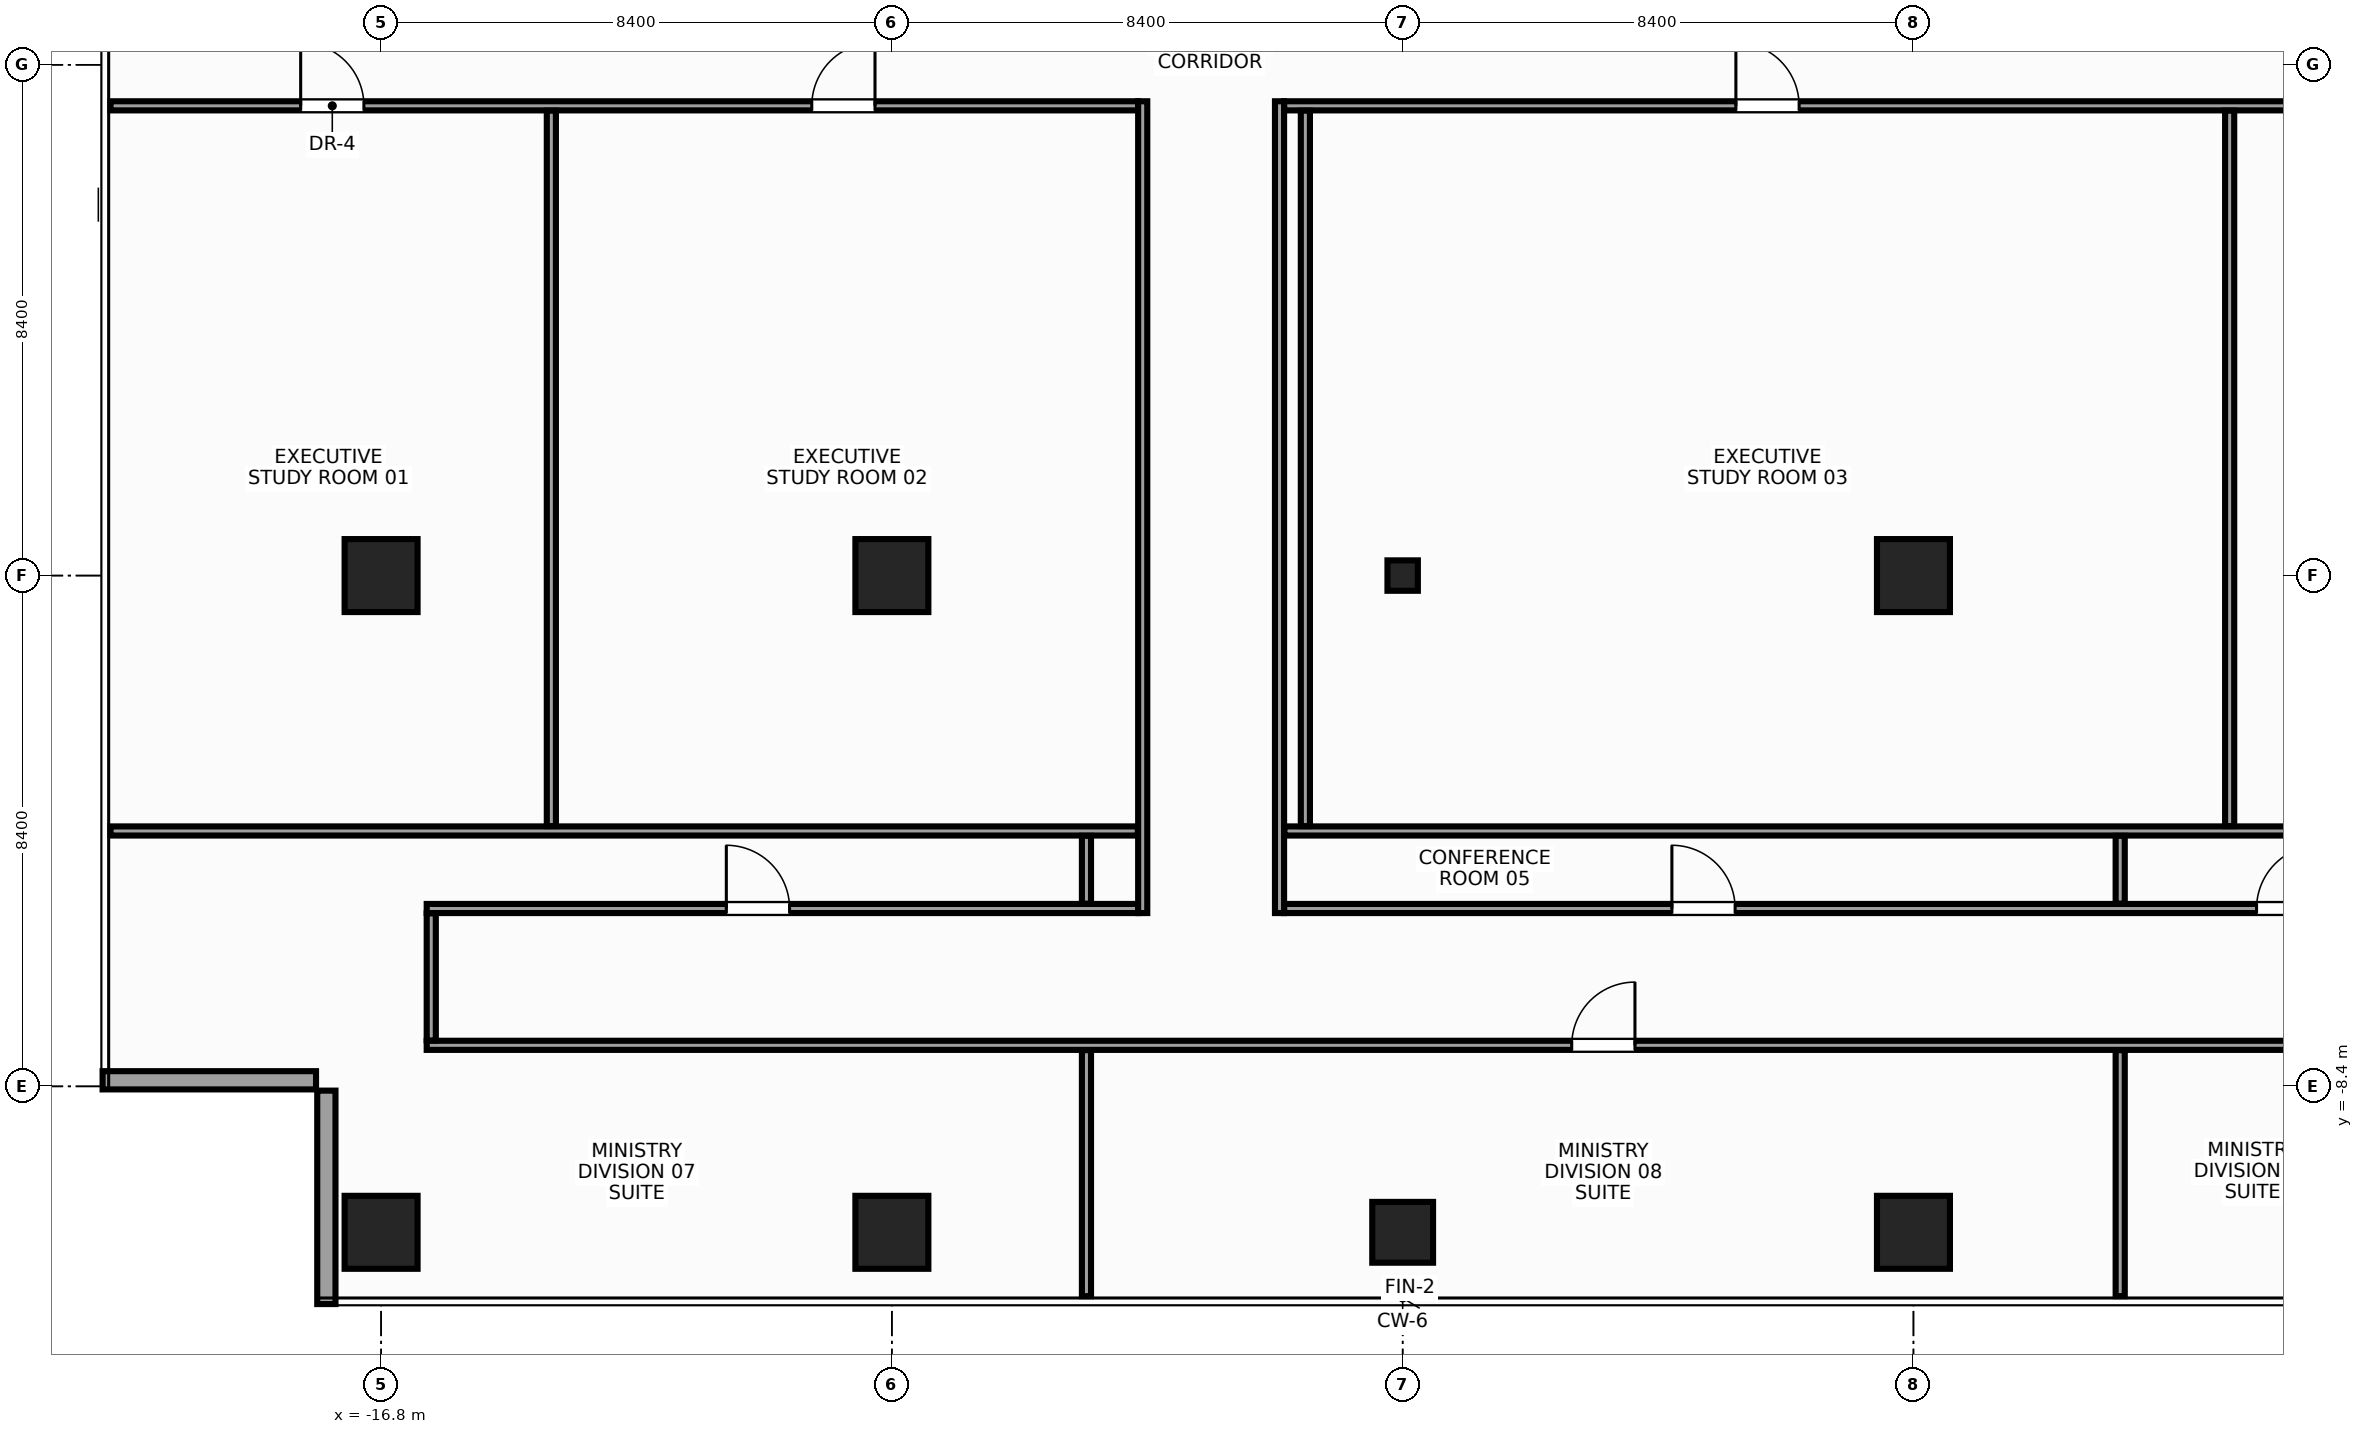
"""IFC4 building model, lengths in metres.
Left out: names, types, materials, properties, quantities, classifications, styles, units other than length and angle.
Written with IfcOpenShell. Run it as: python <this file> out.ifc"""

import sys

from ifc_helpers import new_model, si_unit, direction, frame, frame_2d, origin, origin_with_axes, origin_2d, place, context, subcontext, project, spatial, rectangle, hollow_rectangle, extrude, source, transform, mapped, element, fill, save


model = new_model("IFC4")
c1 = context("Model", 3, precision=1e-05, world=origin(), true_north=direction((0.0, 1.0)))
c2 = subcontext(c1, "Body", "Model", "MODEL_VIEW")
j1 = project(units=[si_unit("LENGTHUNIT", "METRE"), si_unit("PLANEANGLEUNIT", "RADIAN")], contexts=[c1])
p1 = place(None, origin())
s1 = spatial("IfcSite", under=j1, at=p1, CompositionType="ELEMENT")
p2 = place(p1, origin())
s2 = spatial("IfcBuilding", under=s1, at=p2, CompositionType="ELEMENT")
p3 = place(p2, frame((0.0, 0.0, 282.8)))
s3 = spatial("IfcBuildingStorey", under=s2, at=p3, CompositionType="ELEMENT", Elevation=282.8)
m1 = source(origin(), c2, "Body", "SweptSolid", [
    extrude(rectangle(XDim=1.2, YDim=1.2, at=origin_2d()), origin(), (0.0, 0.0, 1.0), 3.6),
])
for number, where, z_axis, x_axis in (
    (1, (-16.8, -10.8, 0.0), (0.0, 0.0, 1.0), (1.0, 0.0, 0.0)),
    (2, (-16.8, 0.0, 0.0), (0.0, 0.0, 1.0), (1.0, 0.0, 0.0)),
    (3, (-8.4, 0.0, 0.0), (0.0, 0.0, 1.0), (1.0, 0.0, 0.0)),
    (4, (-8.4, -10.8, 0.0), (0.0, 0.0, 1.0), (1.0, 0.0, 0.0)),
    (5, (8.4, 0.0, 0.0), (0.0, 0.0, 1.0), (1.0, 0.0, 0.0)),
    (6, (8.4, -10.8, 0.0), (0.0, 0.0, 1.0), (1.0, 0.0, 0.0)),
):
    element("IfcColumn", number, at=place(p3, frame(where, z_axis=z_axis, x_axis=x_axis)), inside=s3, PredefinedType="COLUMN", context=c2, shape_type="MappedRepresentation", body=[
        mapped(m1, transform((0.0, 0.0, 0.0), x_axis=(1.0, 0.0, 0.0), y_axis=(0.0, 1.0, 0.0), z_axis=(0.0, 0.0, 1.0), scale=1.0)),
    ])
m2 = source(origin(), c2, "Body", "SweptSolid", [
    extrude(rectangle(XDim=1.0, YDim=1.0, at=origin_2d()), origin(), (0.0, 0.0, 1.0), 3.6),
])
p4 = place(p3, frame((0.0, -10.8, 0.0), z_axis=(0.0, 0.0, 1.0), x_axis=(1.0, 0.0, 0.0)))
e7 = element("IfcColumn", 7, at=p4, inside=s3, PredefinedType="COLUMN", context=c2, shape_type="MappedRepresentation", body=[
    mapped(m2, transform((0.0, 0.0, 0.0), x_axis=(1.0, 0.0, 0.0), y_axis=(0.0, 1.0, 0.0), z_axis=(0.0, 0.0, 1.0), scale=1.0)),
])
m3 = source(origin(), c2, "Body", "SweptSolid", [
    extrude(hollow_rectangle(XDim=0.5, YDim=0.5, WallThickness=0.025, at=origin_2d()), origin(), (0.0, 0.0, 1.0), 3.6),
])
p5 = place(p3, origin_with_axes())
e8 = element("IfcColumn", 8, at=p5, inside=s3, PredefinedType="COLUMN", context=c2, shape_type="MappedRepresentation", body=[
    mapped(m3, transform((0.0, 0.0, 0.0), x_axis=(1.0, 0.0, 0.0), y_axis=(0.0, 1.0, 0.0), z_axis=(0.0, 0.0, 1.0), scale=1.0)),
])
m4 = source(origin(), c2, "Body", "SweptSolid", [
    extrude(rectangle(XDim=3.51, YDim=0.3, at=frame_2d((1.755, 0.0))), origin(), (0.0, 0.0, 1.0), 2.75),
])
p6 = place(p3, frame((-21.38, -8.3, 0.0), z_axis=(0.0, 0.0, 1.0), x_axis=(1.0, 0.0, 0.0)))
e9 = element("IfcWall", 9, at=p6, inside=s3, PredefinedType="STANDARD", context=c2, shape_type="MappedRepresentation", body=[
    mapped(m4, transform((0.0, 0.0, 0.0), x_axis=(1.0, 0.0, 0.0), y_axis=(0.0, 1.0, 0.0), z_axis=(0.0, 0.0, 1.0), scale=1.0)),
])
m5 = source(origin(), c2, "Body", "SweptSolid", [
    extrude(rectangle(XDim=3.51, YDim=0.3, at=frame_2d((1.755, 0.0))), origin(), (0.0, 0.0, 1.0), 2.75),
])
p7 = place(p3, frame((-17.7, -8.47, 0.0), z_axis=(0.0, 0.0, 1.0), x_axis=(0.0, -1.0, 0.0)))
e10 = element("IfcWall", 10, at=p7, inside=s3, PredefinedType="STANDARD", context=c2, shape_type="MappedRepresentation", body=[
    mapped(m5, transform((0.0, 0.0, 0.0), x_axis=(1.0, 0.0, 0.0), y_axis=(0.0, 1.0, 0.0), z_axis=(0.0, 0.0, 1.0), scale=1.0)),
])
m6 = source(origin(), c2, "Body", "SweptSolid", [
    extrude(rectangle(XDim=16.9, YDim=0.15, at=frame_2d((8.45, 0.0))), origin(), (0.0, 0.0, 1.0), 2.755),
])
p8 = place(p3, frame((-21.25, 7.725, 0.0), z_axis=(0.0, 0.0, 1.0), x_axis=(1.0, 0.0, 0.0)))
e11 = element("IfcWall", 11, at=p8, inside=s3, PredefinedType="PARTITIONING", context=c2, shape_type="MappedRepresentation", body=[
    mapped(m6, transform((0.0, 0.0, 0.0), x_axis=(1.0, 0.0, 0.0), y_axis=(0.0, 1.0, 0.0), z_axis=(0.0, 0.0, 1.0), scale=1.0)),
])
p9 = place(p8, frame((3.127, 0.0, 0.0)))
e12 = element("IfcOpeningElement", 12, at=p9, cuts=e11, PredefinedType="OPENING", context=c2, shape_type="SweptSolid", body=[
    extrude(rectangle(XDim=1.04, YDim=2.2, at=frame_2d((0.52, 1.1))), frame((0.0, 0.087, 0.0), z_axis=(0.0, -1.0, 0.0), x_axis=(1.0, 0.0, 0.0)), (0.0, 0.0, 1.0), 0.174),
])
p10 = place(p8, frame((11.532, 0.0, 0.0)))
e13 = element("IfcOpeningElement", 13, at=p10, cuts=e11, PredefinedType="OPENING", context=c2, shape_type="SweptSolid", body=[
    extrude(rectangle(XDim=1.04, YDim=2.2, at=frame_2d((0.52, 1.1))), frame((0.0, 0.087, 0.0), z_axis=(0.0, -1.0, 0.0), x_axis=(1.0, 0.0, 0.0)), (0.0, 0.0, 1.0), 0.174),
])
m7 = source(origin(), c2, "Body", "SweptSolid", [
    extrude(rectangle(XDim=23.2, YDim=0.15, at=frame_2d((11.6, 0.0))), origin(), (0.0, 0.0, 1.0), 2.755),
])
p11 = place(p3, frame((-1.95, 7.725, 0.0), z_axis=(0.0, 0.0, 1.0), x_axis=(1.0, 0.0, 0.0)))
e14 = element("IfcWall", 14, at=p11, inside=s3, PredefinedType="PARTITIONING", context=c2, shape_type="MappedRepresentation", body=[
    mapped(m7, transform((0.0, 0.0, 0.0), x_axis=(1.0, 0.0, 0.0), y_axis=(0.0, 1.0, 0.0), z_axis=(0.0, 0.0, 1.0), scale=1.0)),
])
p12 = place(p11, frame((7.43, 0.0, 0.0)))
e15 = element("IfcOpeningElement", 15, at=p12, cuts=e14, PredefinedType="OPENING", context=c2, shape_type="SweptSolid", body=[
    extrude(rectangle(XDim=1.04, YDim=2.2, at=frame_2d((0.52, 1.1))), frame((0.0, 0.087, 0.0), z_axis=(0.0, -1.0, 0.0), x_axis=(1.0, 0.0, 0.0)), (0.0, 0.0, 1.0), 0.174),
])
p13 = place(p11, frame((18.833, 0.0, 0.0)))
e16 = element("IfcOpeningElement", 16, at=p13, cuts=e14, PredefinedType="OPENING", context=c2, shape_type="SweptSolid", body=[
    extrude(rectangle(XDim=1.04, YDim=2.2, at=frame_2d((0.52, 1.1))), frame((0.0, 0.087, 0.0), z_axis=(0.0, -1.0, 0.0), x_axis=(1.0, 0.0, 0.0)), (0.0, 0.0, 1.0), 0.174),
])
m8 = source(origin(), c2, "Body", "SweptSolid", [
    extrude(rectangle(XDim=11.7, YDim=0.15, at=frame_2d((5.85, 0.0))), origin(), (0.0, 0.0, 1.0), 2.755),
])
p14 = place(p3, frame((-16.05, -5.475, 0.0), z_axis=(0.0, 0.0, 1.0), x_axis=(1.0, 0.0, 0.0)))
e17 = element("IfcWall", 17, at=p14, inside=s3, PredefinedType="PARTITIONING", context=c2, shape_type="MappedRepresentation", body=[
    mapped(m8, transform((0.0, 0.0, 0.0), x_axis=(1.0, 0.0, 0.0), y_axis=(0.0, 1.0, 0.0), z_axis=(0.0, 0.0, 1.0), scale=1.0)),
])
p15 = place(p14, frame((4.927, 0.0, 0.0)))
e18 = element("IfcOpeningElement", 18, at=p15, cuts=e17, PredefinedType="OPENING", context=c2, shape_type="SweptSolid", body=[
    extrude(rectangle(XDim=1.04, YDim=2.2, at=frame_2d((0.52, 1.1))), frame((0.0, 0.087, 0.0), z_axis=(0.0, -1.0, 0.0), x_axis=(1.0, 0.0, 0.0)), (0.0, 0.0, 1.0), 0.174),
])
m9 = source(origin(), c2, "Body", "SweptSolid", [
    extrude(rectangle(XDim=18.0, YDim=0.15, at=frame_2d((9.0, 0.0))), origin(), (0.0, 0.0, 1.0), 2.755),
])
p16 = place(p3, frame((-1.95, -5.475, 0.0), z_axis=(0.0, 0.0, 1.0), x_axis=(1.0, 0.0, 0.0)))
e19 = element("IfcWall", 19, at=p16, inside=s3, PredefinedType="PARTITIONING", context=c2, shape_type="MappedRepresentation", body=[
    mapped(m9, transform((0.0, 0.0, 0.0), x_axis=(1.0, 0.0, 0.0), y_axis=(0.0, 1.0, 0.0), z_axis=(0.0, 0.0, 1.0), scale=1.0)),
])
p17 = place(p16, frame((6.377, 0.0, 0.0)))
e20 = element("IfcOpeningElement", 20, at=p17, cuts=e19, PredefinedType="OPENING", context=c2, shape_type="SweptSolid", body=[
    extrude(rectangle(XDim=1.04, YDim=2.2, at=frame_2d((0.52, 1.1))), frame((0.0, 0.087, 0.0), z_axis=(0.0, -1.0, 0.0), x_axis=(1.0, 0.0, 0.0)), (0.0, 0.0, 1.0), 0.174),
])
p18 = place(p16, frame((15.992, 0.0, 0.0)))
e21 = element("IfcOpeningElement", 21, at=p18, cuts=e19, PredefinedType="OPENING", context=c2, shape_type="SweptSolid", body=[
    extrude(rectangle(XDim=1.04, YDim=2.2, at=frame_2d((0.52, 1.1))), frame((0.0, 0.087, 0.0), z_axis=(0.0, -1.0, 0.0), x_axis=(1.0, 0.0, 0.0)), (0.0, 0.0, 1.0), 0.174),
])
m10 = source(origin(), c2, "Body", "SweptSolid", [
    extrude(rectangle(XDim=32.1, YDim=0.15, at=frame_2d((16.05, 0.0))), origin(), (0.0, 0.0, 1.0), 2.755),
])
p19 = place(p3, frame((-16.05, -7.725, 0.0), z_axis=(0.0, 0.0, 1.0), x_axis=(1.0, 0.0, 0.0)))
e22 = element("IfcWall", 22, at=p19, inside=s3, PredefinedType="PARTITIONING", context=c2, shape_type="MappedRepresentation", body=[
    mapped(m10, transform((0.0, 0.0, 0.0), x_axis=(1.0, 0.0, 0.0), y_axis=(0.0, 1.0, 0.0), z_axis=(0.0, 0.0, 1.0), scale=1.0)),
])
p20 = place(p19, frame((18.83, 0.0, 0.0)))
e23 = element("IfcOpeningElement", 23, at=p20, cuts=e22, PredefinedType="OPENING", context=c2, shape_type="SweptSolid", body=[
    extrude(rectangle(XDim=1.04, YDim=2.2, at=frame_2d((0.52, 1.1))), frame((0.0, 0.087, 0.0), z_axis=(0.0, -1.0, 0.0), x_axis=(1.0, 0.0, 0.0)), (0.0, 0.0, 1.0), 0.174),
])
m11 = source(origin(), c2, "Body", "SweptSolid", [
    extrude(rectangle(XDim=13.35, YDim=0.15, at=frame_2d((6.675, 0.0))), origin(), (0.0, 0.0, 1.0), 2.655),
])
for number, where, z_axis, x_axis in (
    (24, (-4.275, -5.55, 0.0), (0.0, 0.0, 1.0), (0.0, 1.0, 0.0)),
    (25, (-2.025, -5.55, 0.0), (0.0, 0.0, 1.0), (0.0, 1.0, 0.0)),
):
    element("IfcWall", number, at=place(p3, frame(where, z_axis=z_axis, x_axis=x_axis)), inside=s3, PredefinedType="PARTITIONING", context=c2, shape_type="MappedRepresentation", body=[
        mapped(m11, transform((0.0, 0.0, 0.0), x_axis=(1.0, 0.0, 0.0), y_axis=(0.0, 1.0, 0.0), z_axis=(0.0, 0.0, 1.0), scale=1.0)),
    ])
m12 = source(origin(), c2, "Body", "SweptSolid", [
    extrude(rectangle(XDim=2.09, YDim=0.15, at=frame_2d((1.045, 0.0))), origin(), (0.0, 0.0, 1.0), 3.37),
])
p21 = place(p3, frame((-15.975, -7.645, 0.0), z_axis=(0.0, 0.0, 1.0), x_axis=(0.0, 1.0, 0.0)))
e26 = element("IfcWall", 26, at=p21, inside=s3, PredefinedType="PARTITIONING", context=c2, shape_type="MappedRepresentation", body=[
    mapped(m12, transform((0.0, 0.0, 0.0), x_axis=(1.0, 0.0, 0.0), y_axis=(0.0, 1.0, 0.0), z_axis=(0.0, 0.0, 1.0), scale=1.0)),
])
m13 = source(origin(), c2, "Body", "SweptSolid", [
    extrude(rectangle(XDim=16.895, YDim=0.15, at=frame_2d((8.448, 0.0))), origin(), (0.0, 0.0, 1.0), 2.755),
])
p22 = place(p3, frame((-21.25, -4.2, 0.0), z_axis=(0.0, 0.0, 1.0), x_axis=(1.0, 0.0, 0.0)))
e27 = element("IfcWall", 27, at=p22, inside=s3, PredefinedType="PARTITIONING", context=c2, shape_type="MappedRepresentation", body=[
    mapped(m13, transform((0.0, 0.0, 0.0), x_axis=(1.0, 0.0, 0.0), y_axis=(0.0, 1.0, 0.0), z_axis=(0.0, 0.0, 1.0), scale=1.0)),
])
m14 = source(origin(), c2, "Body", "SweptSolid", [
    extrude(rectangle(XDim=23.195, YDim=0.15, at=frame_2d((11.598, 0.0))), origin(), (0.0, 0.0, 1.0), 2.755),
])
p23 = place(p3, frame((-1.945, -4.2, 0.0), z_axis=(0.0, 0.0, 1.0), x_axis=(1.0, 0.0, 0.0)))
e28 = element("IfcWall", 28, at=p23, inside=s3, PredefinedType="PARTITIONING", context=c2, shape_type="MappedRepresentation", body=[
    mapped(m14, transform((0.0, 0.0, 0.0), x_axis=(1.0, 0.0, 0.0), y_axis=(0.0, 1.0, 0.0), z_axis=(0.0, 0.0, 1.0), scale=1.0)),
])
m15 = source(origin(), c2, "Body", "SweptSolid", [
    extrude(rectangle(XDim=11.765, YDim=0.15, at=frame_2d((5.883, 0.0))), origin(), (0.0, 0.0, 1.0), 2.655),
])
for number, where, z_axis, x_axis in (
    (29, (-14.0, -4.12, 0.0), (0.0, 0.0, 1.0), (0.0, 1.0, 0.0)),
    (30, (-1.6, -4.12, 0.0), (0.0, 0.0, 1.0), (0.0, 1.0, 0.0)),
    (31, (13.6, -4.12, 0.0), (0.0, 0.0, 1.0), (0.0, 1.0, 0.0)),
):
    element("IfcWall", number, at=place(p3, frame(where, z_axis=z_axis, x_axis=x_axis)), inside=s3, PredefinedType="PARTITIONING", context=c2, shape_type="MappedRepresentation", body=[
        mapped(m15, transform((0.0, 0.0, 0.0), x_axis=(1.0, 0.0, 0.0), y_axis=(0.0, 1.0, 0.0), z_axis=(0.0, 0.0, 1.0), scale=1.0)),
    ])
m16 = source(origin(), c2, "Body", "SweptSolid", [
    extrude(rectangle(XDim=4.045, YDim=0.15, at=frame_2d((2.022, 0.0))), origin(), (0.0, 0.0, 1.0), 2.905),
])
p24 = place(p3, frame((-5.2, -11.85, 0.0), z_axis=(0.0, 0.0, 1.0), x_axis=(0.0, 1.0, 0.0)))
e32 = element("IfcWall", 32, at=p24, inside=s3, PredefinedType="PARTITIONING", context=c2, shape_type="MappedRepresentation", body=[
    mapped(m16, transform((0.0, 0.0, 0.0), x_axis=(1.0, 0.0, 0.0), y_axis=(0.0, 1.0, 0.0), z_axis=(0.0, 0.0, 1.0), scale=1.0)),
])
m17 = source(origin(), c2, "Body", "SweptSolid", [
    extrude(rectangle(XDim=1.115, YDim=0.15, at=frame_2d((0.558, 0.0))), origin(), (0.0, 0.0, 1.0), 3.37),
])
p25 = place(p3, frame((-5.2, -5.395, 0.0), z_axis=(0.0, 0.0, 1.0), x_axis=(0.0, 1.0, 0.0)))
e33 = element("IfcWall", 33, at=p25, inside=s3, PredefinedType="PARTITIONING", context=c2, shape_type="MappedRepresentation", body=[
    mapped(m17, transform((0.0, 0.0, 0.0), x_axis=(1.0, 0.0, 0.0), y_axis=(0.0, 1.0, 0.0), z_axis=(0.0, 0.0, 1.0), scale=1.0)),
])
p26 = place(p3, frame((11.8, -11.85, 0.0), z_axis=(0.0, 0.0, 1.0), x_axis=(0.0, 1.0, 0.0)))
e34 = element("IfcWall", 34, at=p26, inside=s3, PredefinedType="PARTITIONING", context=c2, shape_type="MappedRepresentation", body=[
    mapped(m16, transform((0.0, 0.0, 0.0), x_axis=(1.0, 0.0, 0.0), y_axis=(0.0, 1.0, 0.0), z_axis=(0.0, 0.0, 1.0), scale=1.0)),
])
p27 = place(p3, frame((11.8, -5.395, 0.0), z_axis=(0.0, 0.0, 1.0), x_axis=(0.0, 1.0, 0.0)))
e35 = element("IfcWall", 35, at=p27, inside=s3, PredefinedType="PARTITIONING", context=c2, shape_type="MappedRepresentation", body=[
    mapped(m17, transform((0.0, 0.0, 0.0), x_axis=(1.0, 0.0, 0.0), y_axis=(0.0, 1.0, 0.0), z_axis=(0.0, 0.0, 1.0), scale=1.0)),
])
m18 = source(origin(), c2, "Body", "SweptSolid", [
    extrude(rectangle(XDim=1.04, YDim=2.2, at=frame_2d((0.52, 1.1))), frame((0.0, 0.025, 0.0), z_axis=(0.0, -1.0, 0.0), x_axis=(1.0, 0.0, 0.0)), (0.0, 0.0, 1.0), 0.05),
])
p28 = place(p9, origin())
e36 = element("IfcDoor", 36, at=p28, inside=s3, OperationType="SINGLE_SWING_LEFT", PredefinedType="DOOR", context=c2, shape_type="MappedRepresentation", body=[
    mapped(m18, transform((0.0, 0.0, 0.0), x_axis=(1.0, 0.0, 0.0), y_axis=(0.0, 1.0, 0.0), z_axis=(0.0, 0.0, 1.0), scale=1.0)),
])
fill(e12, e36)
p29 = place(p10, origin())
e37 = element("IfcDoor", 37, at=p29, inside=s3, OperationType="SINGLE_SWING_RIGHT", PredefinedType="DOOR", context=c2, shape_type="MappedRepresentation", body=[
    mapped(m18, transform((0.0, 0.0, 0.0), x_axis=(1.0, 0.0, 0.0), y_axis=(0.0, 1.0, 0.0), z_axis=(0.0, 0.0, 1.0), scale=1.0)),
])
fill(e13, e37)
p30 = place(p12, origin())
e38 = element("IfcDoor", 38, at=p30, inside=s3, OperationType="SINGLE_SWING_LEFT", PredefinedType="DOOR", context=c2, shape_type="MappedRepresentation", body=[
    mapped(m18, transform((0.0, 0.0, 0.0), x_axis=(1.0, 0.0, 0.0), y_axis=(0.0, 1.0, 0.0), z_axis=(0.0, 0.0, 1.0), scale=1.0)),
])
fill(e15, e38)
p31 = place(p17, origin())
e39 = element("IfcDoor", 39, at=p31, inside=s3, OperationType="SINGLE_SWING_LEFT", PredefinedType="DOOR", context=c2, shape_type="MappedRepresentation", body=[
    mapped(m18, transform((0.0, 0.0, 0.0), x_axis=(1.0, 0.0, 0.0), y_axis=(0.0, 1.0, 0.0), z_axis=(0.0, 0.0, 1.0), scale=1.0)),
])
fill(e20, e39)
p32 = place(p18, origin())
e40 = element("IfcDoor", 40, at=p32, inside=s3, OperationType="SINGLE_SWING_RIGHT", PredefinedType="DOOR", context=c2, shape_type="MappedRepresentation", body=[
    mapped(m18, transform((0.0, 0.0, 0.0), x_axis=(1.0, 0.0, 0.0), y_axis=(0.0, 1.0, 0.0), z_axis=(0.0, 0.0, 1.0), scale=1.0)),
])
fill(e21, e40)
p33 = place(p15, origin())
e41 = element("IfcDoor", 41, at=p33, inside=s3, OperationType="SINGLE_SWING_LEFT", PredefinedType="DOOR", context=c2, shape_type="MappedRepresentation", body=[
    mapped(m18, transform((0.0, 0.0, 0.0), x_axis=(1.0, 0.0, 0.0), y_axis=(0.0, 1.0, 0.0), z_axis=(0.0, 0.0, 1.0), scale=1.0)),
])
fill(e18, e41)
p34 = place(p20, origin())
e42 = element("IfcDoor", 42, at=p34, inside=s3, OperationType="SINGLE_SWING_RIGHT", PredefinedType="DOOR", context=c2, shape_type="MappedRepresentation", body=[
    mapped(m18, transform((0.0, 0.0, 0.0), x_axis=(1.0, 0.0, 0.0), y_axis=(0.0, 1.0, 0.0), z_axis=(0.0, 0.0, 1.0), scale=1.0)),
])
fill(e23, e42)
save(model, sys.argv[1])
